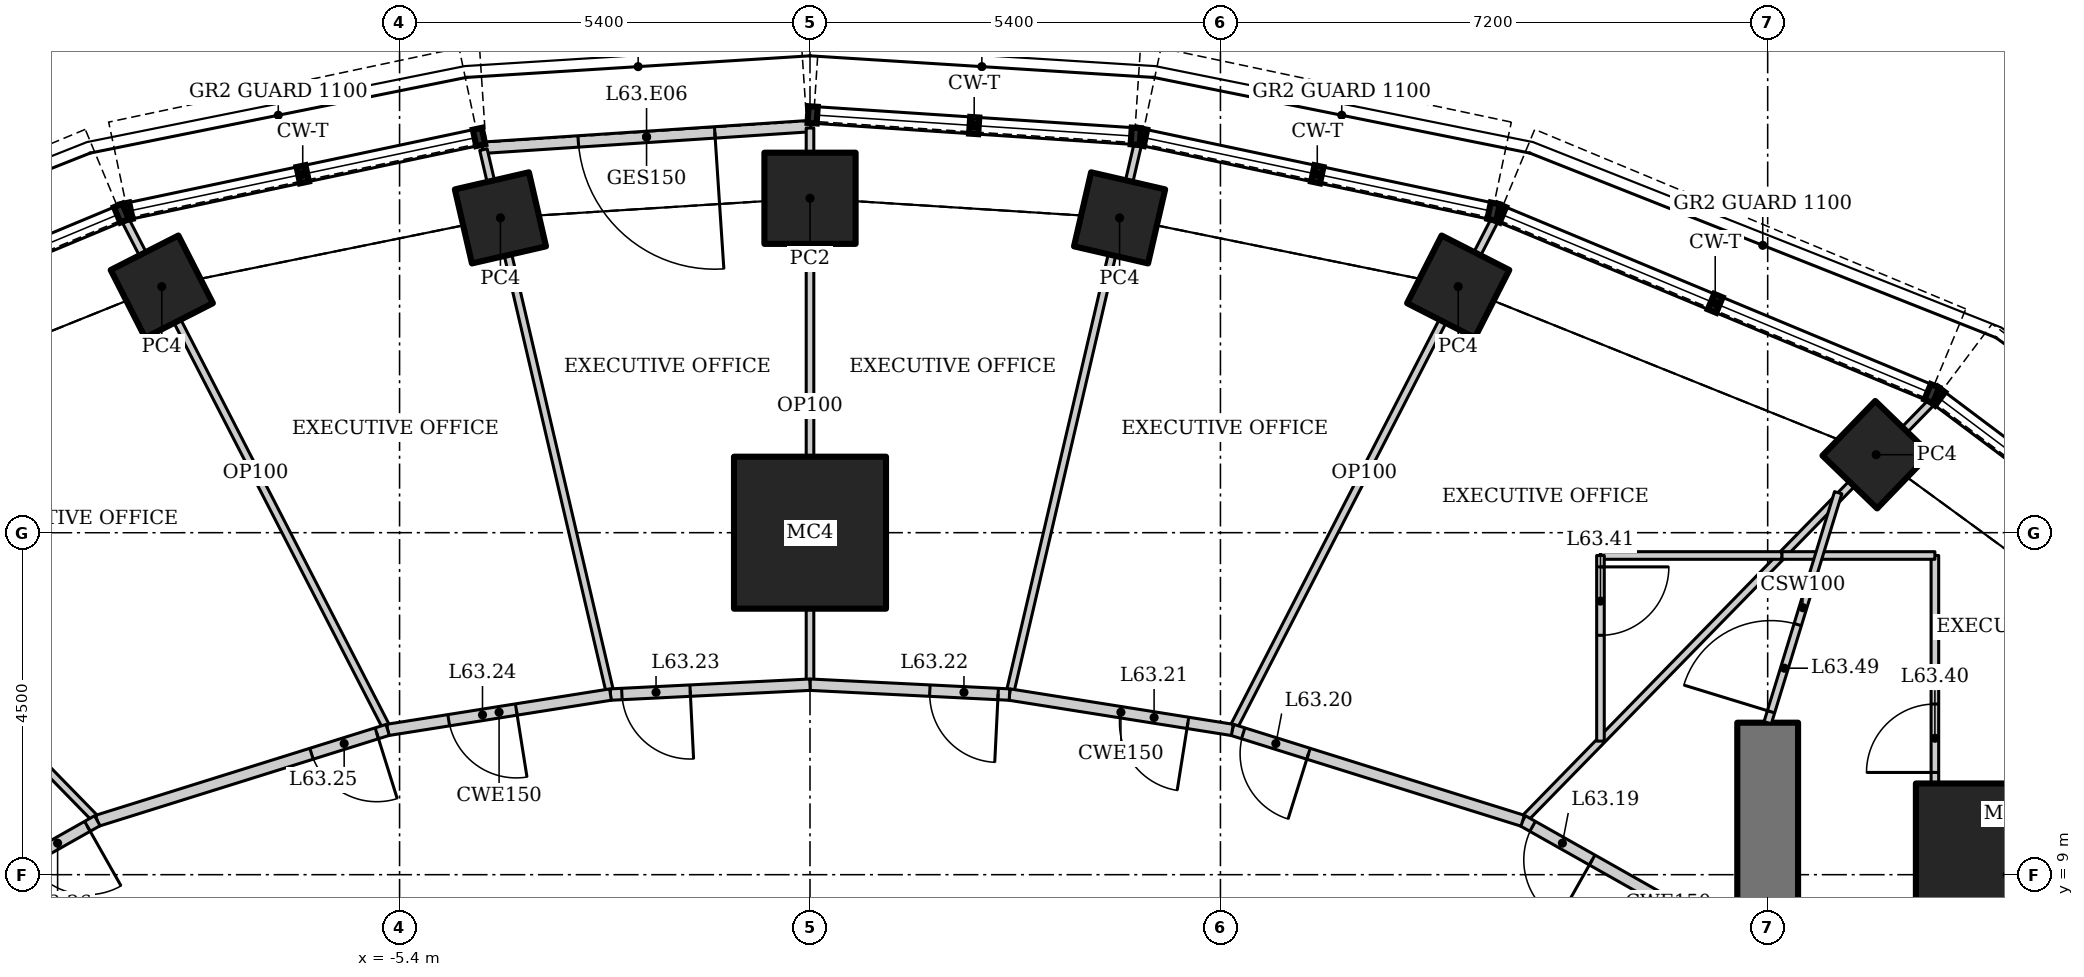
"""IFC4 building model, lengths in metres.
Left out: names, types, materials, properties, quantities, classifications, styles, units other than length and angle.
Written with IfcOpenShell. Run it as: python <this file> out.ifc"""

import sys

from ifc_helpers import new_model, si_unit, direction, frame, frame_2d, origin, origin_2d, place, context, subcontext, project, spatial, rectangle, hollow_rectangle, extrude, element, fill, save


model = new_model("IFC4")
c1 = context("Model", 3, precision=1e-05, world=origin(), true_north=direction((0.0, 1.0)))
c2 = subcontext(c1, "Body", "Model", "MODEL_VIEW")
j1 = project(units=[si_unit("LENGTHUNIT", "METRE"), si_unit("PLANEANGLEUNIT", "RADIAN")], contexts=[c1])
p1 = place(None, origin())
s1 = spatial("IfcSite", under=j1, at=p1, CompositionType="ELEMENT")
p2 = place(p1, origin())
s2 = spatial("IfcBuilding", under=s1, at=p2, CompositionType="ELEMENT")
p3 = place(p2, frame((0.0, 0.0, 270.4)))
s3 = spatial("IfcBuildingStorey", under=s2, at=p3, CompositionType="ELEMENT", Elevation=270.4)
p4 = place(p3, frame((15.75, 9.0, 0.0), z_axis=(0.0, 0.0, 1.0), x_axis=(1.0, 0.0, 0.0)))
e1 = element("IfcColumn", 1, at=p4, inside=s3, PredefinedType="COLUMN", context=c2, shape_type="SweptSolid", body=[
    extrude(hollow_rectangle(XDim=2.4, YDim=2.4, WallThickness=0.12, at=origin_2d()), origin(), (0.0, 0.0, 1.0), 4.5),
])
p5 = place(p3, frame((0.0, 13.5, 0.0), z_axis=(0.0, 0.0, 1.0), x_axis=(1.0, 0.0, 0.0)))
e2 = element("IfcColumn", 2, at=p5, inside=s3, PredefinedType="COLUMN", context=c2, shape_type="SweptSolid", body=[
    extrude(hollow_rectangle(XDim=2.0, YDim=2.0, WallThickness=0.15, at=origin_2d()), origin(), (0.0, 0.0, 1.0), 4.5),
])
p6 = place(p3, frame((14.028, 14.526, 0.947), z_axis=(0.0, 0.0, 1.0), x_axis=(0.694658370459, 0.719339800339, 0.0)))
e3 = element("IfcColumn", 3, at=p6, inside=s3, PredefinedType="COLUMN", context=c2, shape_type="SweptSolid", body=[
    extrude(hollow_rectangle(XDim=1.0, YDim=1.0, WallThickness=0.08, at=origin_2d()), origin(), (0.0, 0.0, 1.0), 3.553),
])
p7 = place(p3, frame((8.528, 16.738, 0.969), z_axis=(0.0, 0.0, 1.0), x_axis=(0.45399049974, 0.891006524188, 0.0)))
e4 = element("IfcColumn", 4, at=p7, inside=s3, PredefinedType="COLUMN", context=c2, shape_type="SweptSolid", body=[
    extrude(hollow_rectangle(XDim=1.0, YDim=1.0, WallThickness=0.08, at=origin_2d()), origin(), (0.0, 0.0, 1.0), 3.531),
])
p8 = place(p3, frame((4.073, 17.642, 0.979), z_axis=(0.0, 0.0, 1.0), x_axis=(0.224951054344, 0.974370064785, 0.0)))
e5 = element("IfcColumn", 5, at=p8, inside=s3, PredefinedType="COLUMN", context=c2, shape_type="SweptSolid", body=[
    extrude(hollow_rectangle(XDim=1.0, YDim=1.0, WallThickness=0.08, at=origin_2d()), origin(), (0.0, 0.0, 1.0), 3.521),
])
p9 = place(p3, frame((0.0, 17.9, 1.178), z_axis=(0.0, 0.0, 1.0), x_axis=(1.0, 0.0, 0.0)))
e6 = element("IfcColumn", 6, at=p9, inside=s3, PredefinedType="COLUMN", context=c2, shape_type="SweptSolid", body=[
    extrude(hollow_rectangle(XDim=1.2, YDim=1.2, WallThickness=0.1, at=origin_2d()), origin(), (0.0, 0.0, 1.0), 3.322),
])
p10 = place(p3, frame((-4.073, 17.642, 0.979), z_axis=(0.0, 0.0, 1.0), x_axis=(0.974370064785, 0.224951054344, 0.0)))
e7 = element("IfcColumn", 7, at=p10, inside=s3, PredefinedType="COLUMN", context=c2, shape_type="SweptSolid", body=[
    extrude(hollow_rectangle(XDim=1.0, YDim=1.0, WallThickness=0.08, at=origin_2d()), origin(), (0.0, 0.0, 1.0), 3.521),
])
p11 = place(p3, frame((-8.528, 16.738, 0.969), z_axis=(0.0, 0.0, 1.0), x_axis=(0.891006524188, 0.45399049974, 0.0)))
e8 = element("IfcColumn", 8, at=p11, inside=s3, PredefinedType="COLUMN", context=c2, shape_type="SweptSolid", body=[
    extrude(hollow_rectangle(XDim=1.0, YDim=1.0, WallThickness=0.08, at=origin_2d()), origin(), (0.0, 0.0, 1.0), 3.531),
])
p12 = place(p3, frame((12.6, -11.0, 0.0), z_axis=(0.0, 0.0, 1.0), x_axis=(0.0, 1.0, 0.0)))
e9 = element("IfcWall", 9, at=p12, inside=s3, PredefinedType="SHEAR", context=c2, shape_type="SweptSolid", body=[
    extrude(rectangle(XDim=22.0, YDim=0.8, at=frame_2d((11.0, 0.0))), origin(), (0.0, 0.0, 1.0), 4.5),
])
p13 = place(p12, frame((10.1, 0.0, 0.0)))
e10 = element("IfcOpeningElement", 10, at=p13, cuts=e9, PredefinedType="OPENING", context=c2, shape_type="SweptSolid", body=[
    extrude(rectangle(XDim=1.8, YDim=2.1, at=frame_2d((0.9, 1.05))), frame((0.0, 0.41, 0.0), z_axis=(0.0, -1.0, 0.0), x_axis=(1.0, 0.0, 0.0)), (0.0, 0.0, 1.0), 0.82),
])
p14 = place(p3, frame((0.01, 18.85, 0.0), z_axis=(0.0, 0.0, 1.0), x_axis=(-0.997817967506, -0.066025023447, 0.0)))
e11 = element("IfcWall", 11, at=p14, inside=s3, PredefinedType="ELEMENTEDWALL", context=c2, shape_type="SweptSolid", body=[
    extrude(rectangle(XDim=4.33, YDim=0.15, at=frame_2d((2.165, 0.0))), origin(), (0.0, 0.0, 1.0), 4.35),
])
p15 = place(p14, frame((1.265, 0.0, 0.0)))
e12 = element("IfcOpeningElement", 12, at=p15, cuts=e11, PredefinedType="OPENING", context=c2, shape_type="SweptSolid", body=[
    extrude(rectangle(XDim=1.8, YDim=2.4, at=frame_2d((0.9, 1.2))), frame((0.0, 0.085, 0.0), z_axis=(0.0, -1.0, 0.0), x_axis=(1.0, 0.0, 0.0)), (0.0, 0.0, 1.0), 0.17),
])
p16 = place(p3, frame((19.959, 11.355, 0.0), z_axis=(0.0, 0.0, 1.0), x_axis=(-0.871035125561, -0.491220734537, 0.0)))
e13 = element("IfcWall", 13, at=p16, inside=s3, PredefinedType="PARTITIONING", context=c2, shape_type="SweptSolid", body=[
    extrude(rectangle(XDim=7.753, YDim=0.1, at=frame_2d((3.877, 0.0))), origin(), (0.0, 0.0, 1.0), 3.824),
])
p17 = place(p3, frame((14.789, 15.251, 0.0), z_axis=(0.0, 0.0, 1.0), x_axis=(-0.698752653188, -0.71536335499, 0.0)))
e14 = element("IfcWall", 14, at=p17, inside=s3, PredefinedType="PARTITIONING", context=c2, shape_type="SweptSolid", body=[
    extrude(rectangle(XDim=7.746, YDim=0.1, at=frame_2d((3.873, 0.0))), origin(), (0.0, 0.0, 1.0), 3.723),
])
p18 = place(p3, frame((9.031, 17.657, 0.0), z_axis=(0.0, 0.0, 1.0), x_axis=(-0.457536153323, -0.889191019074, 0.0)))
e15 = element("IfcWall", 15, at=p18, inside=s3, PredefinedType="PARTITIONING", context=c2, shape_type="SweptSolid", body=[
    extrude(rectangle(XDim=7.594, YDim=0.1, at=frame_2d((3.797, 0.0))), origin(), (0.0, 0.0, 1.0), 3.408),
])
p19 = place(p3, frame((4.324, 18.657, 0.0), z_axis=(0.0, 0.0, 1.0), x_axis=(-0.227020232271, -0.973890042119, 0.0)))
e16 = element("IfcWall", 16, at=p19, inside=s3, PredefinedType="PARTITIONING", context=c2, shape_type="SweptSolid", body=[
    extrude(rectangle(XDim=7.483, YDim=0.1, at=frame_2d((3.741, 0.0))), origin(), (0.0, 0.0, 1.0), 3.408),
])
p20 = place(p3, frame((0.0, 18.825, 0.0), z_axis=(0.0, 0.0, 1.0), x_axis=(0.0, -1.0, 0.0)))
e17 = element("IfcWall", 17, at=p20, inside=s3, PredefinedType="PARTITIONING", context=c2, shape_type="SweptSolid", body=[
    extrude(rectangle(XDim=7.325, YDim=0.1, at=frame_2d((3.662, 0.0))), origin(), (0.0, 0.0, 1.0), 3.944),
])
p21 = place(p3, frame((-4.296, 18.54, 0.0), z_axis=(0.0, 0.0, 1.0), x_axis=(0.227009478686, -0.973892548789, 0.0)))
e18 = element("IfcWall", 18, at=p21, inside=s3, PredefinedType="PARTITIONING", context=c2, shape_type="SweptSolid", body=[
    extrude(rectangle(XDim=7.363, YDim=0.1, at=frame_2d((3.681, 0.0))), origin(), (0.0, 0.0, 1.0), 3.408),
])
p22 = place(p3, frame((-9.031, 17.657, 0.0), z_axis=(0.0, 0.0, 1.0), x_axis=(0.457536153323, -0.889191019074, 0.0)))
e19 = element("IfcWall", 19, at=p22, inside=s3, PredefinedType="PARTITIONING", context=c2, shape_type="SweptSolid", body=[
    extrude(rectangle(XDim=7.594, YDim=0.1, at=frame_2d((3.797, 0.0))), origin(), (0.0, 0.0, 1.0), 3.408),
])
p23 = place(p3, frame((-14.789, 15.251, 0.0), z_axis=(0.0, 0.0, 1.0), x_axis=(0.698752653188, -0.71536335499, 0.0)))
e20 = element("IfcWall", 20, at=p23, inside=s3, PredefinedType="PARTITIONING", context=c2, shape_type="SweptSolid", body=[
    extrude(rectangle(XDim=7.746, YDim=0.1, at=frame_2d((3.873, 0.0))), origin(), (0.0, 0.0, 1.0), 3.723),
])
p24 = place(p3, frame((13.206, 7.546, 0.0), z_axis=(0.0, 0.0, 1.0), x_axis=(-0.870593853694, 0.492002379984, 0.0)))
e21 = element("IfcWall", 21, at=p24, inside=s3, PredefinedType="PARTITIONING", context=c2, shape_type="SweptSolid", body=[
    extrude(rectangle(XDim=4.398, YDim=0.15, at=frame_2d((2.199, 0.0))), origin(), (0.0, 0.0, 1.0), 4.35),
])
p25 = place(p24, frame((3.348, 0.0, 0.0)))
e22 = element("IfcOpeningElement", 22, at=p25, cuts=e21, PredefinedType="OPENING", context=c2, shape_type="SweptSolid", body=[
    extrude(rectangle(XDim=0.9, YDim=2.1, at=frame_2d((0.45, 1.05))), frame((0.0, 0.085, 0.0), z_axis=(0.0, -1.0, 0.0), x_axis=(1.0, 0.0, 0.0)), (0.0, 0.0, 1.0), 0.17),
])
p26 = place(p3, frame((9.377, 9.71, 0.0), z_axis=(0.0, 0.0, 1.0), x_axis=(-0.954393117131, 0.298552806004, 0.0)))
e23 = element("IfcWall", 23, at=p26, inside=s3, PredefinedType="PARTITIONING", context=c2, shape_type="SweptSolid", body=[
    extrude(rectangle(XDim=4.003, YDim=0.15, at=frame_2d((2.001, 0.0))), origin(), (0.0, 0.0, 1.0), 4.35),
])
p27 = place(p26, frame((2.953, 0.0, 0.0)))
e24 = element("IfcOpeningElement", 24, at=p27, cuts=e23, PredefinedType="OPENING", context=c2, shape_type="SweptSolid", body=[
    extrude(rectangle(XDim=0.9, YDim=2.1, at=frame_2d((0.45, 1.05))), frame((0.0, 0.085, 0.0), z_axis=(0.0, -1.0, 0.0), x_axis=(1.0, 0.0, 0.0)), (0.0, 0.0, 1.0), 0.17),
])
p28 = place(p3, frame((5.556, 10.905, 0.0), z_axis=(0.0, 0.0, 1.0), x_axis=(-0.987659371348, 0.156617260185, 0.0)))
e25 = element("IfcWall", 25, at=p28, inside=s3, PredefinedType="PARTITIONING", context=c2, shape_type="SweptSolid", body=[
    extrude(rectangle(XDim=2.968, YDim=0.15, at=frame_2d((1.484, 0.0))), origin(), (0.0, 0.0, 1.0), 4.35),
])
p29 = place(p28, frame((0.592, 0.0, 0.0)))
e26 = element("IfcOpeningElement", 26, at=p29, cuts=e25, PredefinedType="OPENING", context=c2, shape_type="SweptSolid", body=[
    extrude(rectangle(XDim=0.9, YDim=2.1, at=frame_2d((0.45, 1.05))), frame((0.0, 0.085, 0.0), z_axis=(0.0, -1.0, 0.0), x_axis=(1.0, 0.0, 0.0)), (0.0, 0.0, 1.0), 0.17),
])
p30 = place(p3, frame((2.625, 11.37, 0.0), z_axis=(0.0, 0.0, 1.0), x_axis=(-0.99877355978, 0.049511375313, 0.0)))
e27 = element("IfcWall", 27, at=p30, inside=s3, PredefinedType="PARTITIONING", context=c2, shape_type="SweptSolid", body=[
    extrude(rectangle(XDim=2.628, YDim=0.15, at=frame_2d((1.314, 0.0))), origin(), (0.0, 0.0, 1.0), 4.35),
])
p31 = place(p30, frame((0.15, 0.0, 0.0)))
e28 = element("IfcOpeningElement", 28, at=p31, cuts=e27, PredefinedType="OPENING", context=c2, shape_type="SweptSolid", body=[
    extrude(rectangle(XDim=0.9, YDim=2.1, at=frame_2d((0.45, 1.05))), frame((0.0, 0.085, 0.0), z_axis=(0.0, -1.0, 0.0), x_axis=(1.0, 0.0, 0.0)), (0.0, 0.0, 1.0), 0.17),
])
p32 = place(p3, frame((0.0, 11.5, 0.0), z_axis=(0.0, 0.0, 1.0), x_axis=(-0.99877355978, -0.049511375313, 0.0)))
e29 = element("IfcWall", 29, at=p32, inside=s3, PredefinedType="PARTITIONING", context=c2, shape_type="SweptSolid", body=[
    extrude(rectangle(XDim=2.628, YDim=0.15, at=frame_2d((1.314, 0.0))), origin(), (0.0, 0.0, 1.0), 4.35),
])
p33 = place(p32, frame((1.578, 0.0, 0.0)))
e30 = element("IfcOpeningElement", 30, at=p33, cuts=e29, PredefinedType="OPENING", context=c2, shape_type="SweptSolid", body=[
    extrude(rectangle(XDim=0.9, YDim=2.1, at=frame_2d((0.45, 1.05))), frame((0.0, 0.085, 0.0), z_axis=(0.0, -1.0, 0.0), x_axis=(1.0, 0.0, 0.0)), (0.0, 0.0, 1.0), 0.17),
])
p34 = place(p3, frame((-2.625, 11.37, 0.0), z_axis=(0.0, 0.0, 1.0), x_axis=(-0.987659371348, -0.156617260185, 0.0)))
e31 = element("IfcWall", 31, at=p34, inside=s3, PredefinedType="PARTITIONING", context=c2, shape_type="SweptSolid", body=[
    extrude(rectangle(XDim=2.968, YDim=0.15, at=frame_2d((1.484, 0.0))), origin(), (0.0, 0.0, 1.0), 4.35),
])
p35 = place(p34, frame((1.255, 0.0, 0.0)))
e32 = element("IfcOpeningElement", 32, at=p35, cuts=e31, PredefinedType="OPENING", context=c2, shape_type="SweptSolid", body=[
    extrude(rectangle(XDim=0.9, YDim=2.1, at=frame_2d((0.45, 1.05))), frame((0.0, 0.085, 0.0), z_axis=(0.0, -1.0, 0.0), x_axis=(1.0, 0.0, 0.0)), (0.0, 0.0, 1.0), 0.17),
])
p36 = place(p3, frame((-5.556, 10.905, 0.0), z_axis=(0.0, 0.0, 1.0), x_axis=(-0.954393117131, -0.298552806004, 0.0)))
e33 = element("IfcWall", 33, at=p36, inside=s3, PredefinedType="PARTITIONING", context=c2, shape_type="SweptSolid", body=[
    extrude(rectangle(XDim=4.003, YDim=0.15, at=frame_2d((2.001, 0.0))), origin(), (0.0, 0.0, 1.0), 4.35),
])
p37 = place(p36, frame((0.15, 0.0, 0.0)))
e34 = element("IfcOpeningElement", 34, at=p37, cuts=e33, PredefinedType="OPENING", context=c2, shape_type="SweptSolid", body=[
    extrude(rectangle(XDim=0.9, YDim=2.1, at=frame_2d((0.45, 1.05))), frame((0.0, 0.085, 0.0), z_axis=(0.0, -1.0, 0.0), x_axis=(1.0, 0.0, 0.0)), (0.0, 0.0, 1.0), 0.17),
])
p38 = place(p3, frame((-9.377, 9.71, 0.0), z_axis=(0.0, 0.0, 1.0), x_axis=(-0.870593853694, -0.492002379984, 0.0)))
e35 = element("IfcWall", 35, at=p38, inside=s3, PredefinedType="PARTITIONING", context=c2, shape_type="SweptSolid", body=[
    extrude(rectangle(XDim=4.398, YDim=0.15, at=frame_2d((2.199, 0.0))), origin(), (0.0, 0.0, 1.0), 4.35),
])
p39 = place(p38, frame((0.15, 0.0, 0.0)))
e36 = element("IfcOpeningElement", 36, at=p39, cuts=e35, PredefinedType="OPENING", context=c2, shape_type="SweptSolid", body=[
    extrude(rectangle(XDim=0.9, YDim=2.1, at=frame_2d((0.45, 1.05))), frame((0.0, 0.085, 0.0), z_axis=(0.0, -1.0, 0.0), x_axis=(1.0, 0.0, 0.0)), (0.0, 0.0, 1.0), 0.17),
])
p40 = place(p3, frame((14.8, 8.445, 0.0), z_axis=(0.0, 0.0, 1.0), x_axis=(0.0, 1.0, 0.0)))
e37 = element("IfcWall", 37, at=p40, inside=s3, PredefinedType="PARTITIONING", context=c2, shape_type="SweptSolid", body=[
    extrude(rectangle(XDim=4.755, YDim=0.1, at=frame_2d((2.377, 0.0))), origin(), (0.0, 0.0, 1.0), 4.35),
])
p41 = place(p40, frame((1.9, 0.0, 0.0)))
e38 = element("IfcOpeningElement", 38, at=p41, cuts=e37, PredefinedType="OPENING", context=c2, shape_type="SweptSolid", body=[
    extrude(rectangle(XDim=0.9, YDim=2.1, at=frame_2d((0.45, 1.05))), frame((0.0, 0.06, 0.0), z_axis=(0.0, -1.0, 0.0), x_axis=(1.0, 0.0, 0.0)), (0.0, 0.0, 1.0), 0.12),
])
p42 = place(p3, frame((14.8, 13.2, 0.0), z_axis=(0.0, 0.0, 1.0), x_axis=(-1.0, 0.0, 0.0)))
e39 = element("IfcWall", 39, at=p42, inside=s3, PredefinedType="PARTITIONING", context=c2, shape_type="SweptSolid", body=[
    extrude(rectangle(XDim=2.014, YDim=0.1, at=frame_2d((1.007, 0.0))), origin(), (0.0, 0.0, 1.0), 4.35),
])
p43 = place(p3, frame((12.786, 13.2, 0.0), z_axis=(0.0, 0.0, 1.0), x_axis=(-1.0, 0.0, 0.0)))
e40 = element("IfcWall", 40, at=p43, inside=s3, PredefinedType="PARTITIONING", context=c2, shape_type="SweptSolid", body=[
    extrude(rectangle(XDim=2.386, YDim=0.1, at=frame_2d((1.193, 0.0))), origin(), (0.0, 0.0, 1.0), 4.35),
])
p44 = place(p3, frame((10.4, 13.2, 0.0), z_axis=(0.0, 0.0, 1.0), x_axis=(0.0, -1.0, 0.0)))
e41 = element("IfcWall", 41, at=p44, inside=s3, PredefinedType="PARTITIONING", context=c2, shape_type="SweptSolid", body=[
    extrude(rectangle(XDim=2.442, YDim=0.1, at=frame_2d((1.221, 0.0))), origin(), (0.0, 0.0, 1.0), 4.35),
])
p45 = place(p44, frame((0.15, 0.0, 0.0)))
e42 = element("IfcOpeningElement", 42, at=p45, cuts=e41, PredefinedType="OPENING", context=c2, shape_type="SweptSolid", body=[
    extrude(rectangle(XDim=0.9, YDim=2.1, at=frame_2d((0.45, 1.05))), frame((0.0, 0.06, 0.0), z_axis=(0.0, -1.0, 0.0), x_axis=(1.0, 0.0, 0.0)), (0.0, 0.0, 1.0), 0.12),
])
p46 = place(p3, frame((12.6, 11.0, 0.0), z_axis=(0.0, 0.0, 1.0), x_axis=(0.293039542174, 0.95610032252, 0.0)))
e43 = element("IfcWall", 43, at=p46, inside=s3, PredefinedType="PARTITIONING", context=c2, shape_type="SweptSolid", body=[
    extrude(rectangle(XDim=3.165, YDim=0.1, at=frame_2d((1.583, 0.0))), origin(), (0.0, 0.0, 1.0), 4.35),
])
p47 = place(p46, frame((0.15, 0.0, 0.0)))
e44 = element("IfcOpeningElement", 44, at=p47, cuts=e43, PredefinedType="OPENING", context=c2, shape_type="SweptSolid", body=[
    extrude(rectangle(XDim=1.2, YDim=2.1, at=frame_2d((0.6, 1.05))), frame((0.0, 0.06, 0.0), z_axis=(0.0, -1.0, 0.0), x_axis=(1.0, 0.0, 0.0)), (0.0, 0.0, 1.0), 0.12),
])
p48 = place(p15, origin())
e45 = element("IfcDoor", 45, at=p48, inside=s3, OperationType="DOUBLE_DOOR_DOUBLE_SWING", PredefinedType="DOOR", context=c2, shape_type="SweptSolid", body=[
    extrude(rectangle(XDim=1.8, YDim=2.4, at=frame_2d((0.9, 1.2))), frame((0.0, 0.025, 0.0), z_axis=(0.0, -1.0, 0.0), x_axis=(1.0, 0.0, 0.0)), (0.0, 0.0, 1.0), 0.05),
])
fill(e12, e45)
p49 = place(p25, origin())
e46 = element("IfcDoor", 46, at=p49, inside=s3, OperationType="SINGLE_SWING_LEFT", PredefinedType="DOOR", context=c2, shape_type="SweptSolid", body=[
    extrude(rectangle(XDim=0.9, YDim=2.1, at=frame_2d((0.45, 1.05))), frame((0.0, 0.025, 0.0), z_axis=(0.0, -1.0, 0.0), x_axis=(1.0, 0.0, 0.0)), (0.0, 0.0, 1.0), 0.05),
])
fill(e22, e46)
p50 = place(p27, origin())
e47 = element("IfcDoor", 47, at=p50, inside=s3, OperationType="SINGLE_SWING_LEFT", PredefinedType="DOOR", context=c2, shape_type="SweptSolid", body=[
    extrude(rectangle(XDim=0.9, YDim=2.1, at=frame_2d((0.45, 1.05))), frame((0.0, 0.025, 0.0), z_axis=(0.0, -1.0, 0.0), x_axis=(1.0, 0.0, 0.0)), (0.0, 0.0, 1.0), 0.05),
])
fill(e24, e47)
p51 = place(p29, origin())
e48 = element("IfcDoor", 48, at=p51, inside=s3, OperationType="SINGLE_SWING_LEFT", PredefinedType="DOOR", context=c2, shape_type="SweptSolid", body=[
    extrude(rectangle(XDim=0.9, YDim=2.1, at=frame_2d((0.45, 1.05))), frame((0.0, 0.025, 0.0), z_axis=(0.0, -1.0, 0.0), x_axis=(1.0, 0.0, 0.0)), (0.0, 0.0, 1.0), 0.05),
])
fill(e26, e48)
p52 = place(p31, origin())
e49 = element("IfcDoor", 49, at=p52, inside=s3, OperationType="SINGLE_SWING_LEFT", PredefinedType="DOOR", context=c2, shape_type="SweptSolid", body=[
    extrude(rectangle(XDim=0.9, YDim=2.1, at=frame_2d((0.45, 1.05))), frame((0.0, 0.025, 0.0), z_axis=(0.0, -1.0, 0.0), x_axis=(1.0, 0.0, 0.0)), (0.0, 0.0, 1.0), 0.05),
])
fill(e28, e49)
p53 = place(p33, origin())
e50 = element("IfcDoor", 50, at=p53, inside=s3, OperationType="SINGLE_SWING_LEFT", PredefinedType="DOOR", context=c2, shape_type="SweptSolid", body=[
    extrude(rectangle(XDim=0.9, YDim=2.1, at=frame_2d((0.45, 1.05))), frame((0.0, 0.025, 0.0), z_axis=(0.0, -1.0, 0.0), x_axis=(1.0, 0.0, 0.0)), (0.0, 0.0, 1.0), 0.05),
])
fill(e30, e50)
p54 = place(p35, origin())
e51 = element("IfcDoor", 51, at=p54, inside=s3, OperationType="SINGLE_SWING_LEFT", PredefinedType="DOOR", context=c2, shape_type="SweptSolid", body=[
    extrude(rectangle(XDim=0.9, YDim=2.1, at=frame_2d((0.45, 1.05))), frame((0.0, 0.025, 0.0), z_axis=(0.0, -1.0, 0.0), x_axis=(1.0, 0.0, 0.0)), (0.0, 0.0, 1.0), 0.05),
])
fill(e32, e51)
p55 = place(p37, origin())
e52 = element("IfcDoor", 52, at=p55, inside=s3, OperationType="SINGLE_SWING_LEFT", PredefinedType="DOOR", context=c2, shape_type="SweptSolid", body=[
    extrude(rectangle(XDim=0.9, YDim=2.1, at=frame_2d((0.45, 1.05))), frame((0.0, 0.025, 0.0), z_axis=(0.0, -1.0, 0.0), x_axis=(1.0, 0.0, 0.0)), (0.0, 0.0, 1.0), 0.05),
])
fill(e34, e52)
p56 = place(p39, origin())
e53 = element("IfcDoor", 53, at=p56, inside=s3, OperationType="SINGLE_SWING_LEFT", PredefinedType="DOOR", context=c2, shape_type="SweptSolid", body=[
    extrude(rectangle(XDim=0.9, YDim=2.1, at=frame_2d((0.45, 1.05))), frame((0.0, 0.025, 0.0), z_axis=(0.0, -1.0, 0.0), x_axis=(1.0, 0.0, 0.0)), (0.0, 0.0, 1.0), 0.05),
])
fill(e36, e53)
p57 = place(p41, origin())
e54 = element("IfcDoor", 54, at=p57, inside=s3, OperationType="SINGLE_SWING_LEFT", PredefinedType="DOOR", context=c2, shape_type="SweptSolid", body=[
    extrude(rectangle(XDim=0.9, YDim=2.1, at=frame_2d((0.45, 1.05))), frame((0.0, 0.025, 0.0), z_axis=(0.0, -1.0, 0.0), x_axis=(1.0, 0.0, 0.0)), (0.0, 0.0, 1.0), 0.05),
])
fill(e38, e54)
p58 = place(p45, origin())
e55 = element("IfcDoor", 55, at=p58, inside=s3, OperationType="SINGLE_SWING_LEFT", PredefinedType="DOOR", context=c2, shape_type="SweptSolid", body=[
    extrude(rectangle(XDim=0.9, YDim=2.1, at=frame_2d((0.45, 1.05))), frame((0.0, 0.025, 0.0), z_axis=(0.0, -1.0, 0.0), x_axis=(1.0, 0.0, 0.0)), (0.0, 0.0, 1.0), 0.05),
])
fill(e42, e55)
p59 = place(p47, origin())
e56 = element("IfcDoor", 56, at=p59, inside=s3, OperationType="DOUBLE_DOOR_DOUBLE_SWING", PredefinedType="DOOR", context=c2, shape_type="SweptSolid", body=[
    extrude(rectangle(XDim=1.2, YDim=2.1, at=frame_2d((0.6, 1.05))), frame((0.0, 0.025, 0.0), z_axis=(0.0, -1.0, 0.0), x_axis=(1.0, 0.0, 0.0)), (0.0, 0.0, 1.0), 0.05),
])
fill(e44, e56)
save(model, sys.argv[1])
